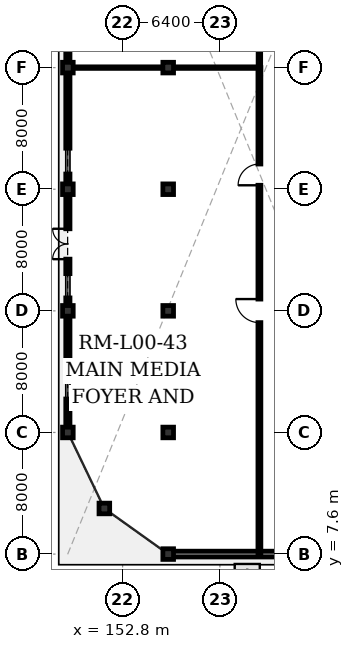
"""IFC4 building model, lengths in metres.
Left out: names, types, materials, properties, quantities, classifications, styles, units other than length and angle.
Written with IfcOpenShell. Run it as: python <this file> out.ifc"""

import sys

from ifc_helpers import new_model, si_unit, direction, frame, frame_2d, origin, origin_2d, place, context, subcontext, project, spatial, rectangle, extrude, element, fill, save


model = new_model("IFC4")
c1 = context("Model", 3, precision=1e-05, world=origin(), true_north=direction((0.0, 1.0)))
c2 = subcontext(c1, "Body", "Model", "MODEL_VIEW")
j1 = project(units=[si_unit("LENGTHUNIT", "METRE"), si_unit("PLANEANGLEUNIT", "RADIAN")], contexts=[c1])
p1 = place(None, origin())
s1 = spatial("IfcSite", under=j1, at=p1, CompositionType="ELEMENT")
p2 = place(p1, origin())
s2 = spatial("IfcBuilding", under=s1, at=p2, CompositionType="ELEMENT")
p3 = place(p2, origin())
s3 = spatial("IfcBuildingStorey", under=s2, at=p3, CompositionType="ELEMENT", Elevation=0.0)
for number, where, z_axis, x_axis in (
    (1, (149.2, 15.6, 0.0), (0.0, 0.0, 1.0), (1.0, 0.0, 0.0)),
    (2, (149.2, 23.6, 0.0), (0.0, 0.0, 1.0), (1.0, 0.0, 0.0)),
    (3, (149.2, 31.6, 0.0), (0.0, 0.0, 1.0), (1.0, 0.0, 0.0)),
    (4, (149.2, 39.6, 0.0), (0.0, 0.0, 1.0), (1.0, 0.0, 0.0)),
    (5, (151.6, 10.6, 0.0), (0.0, 0.0, 1.0), (1.0, 0.0, 0.0)),
    (6, (155.8, 7.6, 0.0), (0.0, 0.0, 1.0), (1.0, 0.0, 0.0)),
    (7, (155.8, 15.6, 0.0), (0.0, 0.0, 1.0), (1.0, 0.0, 0.0)),
    (8, (155.8, 23.6, 0.0), (0.0, 0.0, 1.0), (1.0, 0.0, 0.0)),
    (9, (155.8, 31.6, 0.0), (0.0, 0.0, 1.0), (1.0, 0.0, 0.0)),
    (10, (155.8, 39.6, 0.0), (0.0, 0.0, 1.0), (1.0, 0.0, 0.0)),
):
    element("IfcColumn", number, at=place(p3, frame(where, z_axis=z_axis, x_axis=x_axis)), inside=s3, PredefinedType="COLUMN", context=c2, shape_type="SweptSolid", body=[
        extrude(rectangle(XDim=0.7, YDim=0.7, at=origin_2d()), origin(), (0.0, 0.0, 1.0), 5.4),
    ])
p4 = place(p3, frame((149.2, 15.6, 0.0), z_axis=(0.0, 0.0, 1.0), x_axis=(0.0, 1.0, 0.0)))
e11 = element("IfcWall", 11, at=p4, inside=s3, PredefinedType="SOLIDWALL", context=c2, shape_type="SweptSolid", body=[
    extrude(rectangle(XDim=48.0, YDim=0.275, at=frame_2d((24.0, 0.0))), origin(), (0.0, 0.0, 1.0), 4.29),
])
p5 = place(p4, frame((11.4, 0.0, 0.0)))
e12 = element("IfcOpeningElement", 12, at=p5, cuts=e11, PredefinedType="OPENING", context=c2, shape_type="SweptSolid", body=[
    extrude(rectangle(XDim=2.0, YDim=2.5, at=frame_2d((1.0, 1.25))), frame((0.0, 0.147, 0.0), z_axis=(0.0, -1.0, 0.0), x_axis=(1.0, 0.0, 0.0)), (0.0, 0.0, 1.0), 0.295),
])
p6 = place(p4, frame((2.2, 0.0, 0.8)))
e13 = element("IfcOpeningElement", 13, at=p6, cuts=e11, PredefinedType="OPENING", context=c2, shape_type="SweptSolid", body=[
    extrude(rectangle(XDim=1.5, YDim=2.1, at=frame_2d((0.75, 1.05))), frame((0.0, 0.147, 0.0), z_axis=(0.0, -1.0, 0.0), x_axis=(1.0, 0.0, 0.0)), (0.0, 0.0, 1.0), 0.295),
])
p7 = place(p4, frame((8.85, 0.0, 0.8)))
e14 = element("IfcOpeningElement", 14, at=p7, cuts=e11, PredefinedType="OPENING", context=c2, shape_type="SweptSolid", body=[
    extrude(rectangle(XDim=1.6, YDim=2.1, at=frame_2d((0.8, 1.05))), frame((0.0, 0.147, 0.0), z_axis=(0.0, -1.0, 0.0), x_axis=(1.0, 0.0, 0.0)), (0.0, 0.0, 1.0), 0.295),
])
p8 = place(p4, frame((17.0, 0.0, 0.8)))
e15 = element("IfcOpeningElement", 15, at=p8, cuts=e11, PredefinedType="OPENING", context=c2, shape_type="SweptSolid", body=[
    extrude(rectangle(XDim=1.7, YDim=2.15, at=frame_2d((0.85, 1.075))), frame((0.0, 0.147, 0.0), z_axis=(0.0, -1.0, 0.0), x_axis=(1.0, 0.0, 0.0)), (0.0, 0.0, 1.0), 0.295),
])
p9 = place(p4, frame((25.15, 0.0, 0.8)))
e16 = element("IfcOpeningElement", 16, at=p9, cuts=e11, PredefinedType="OPENING", context=c2, shape_type="SweptSolid", body=[
    extrude(rectangle(XDim=1.8, YDim=2.15, at=frame_2d((0.9, 1.075))), frame((0.0, 0.147, 0.0), z_axis=(0.0, -1.0, 0.0), x_axis=(1.0, 0.0, 0.0)), (0.0, 0.0, 1.0), 0.295),
])
p10 = place(p4, frame((33.25, 0.0, 0.8)))
e17 = element("IfcOpeningElement", 17, at=p10, cuts=e11, PredefinedType="OPENING", context=c2, shape_type="SweptSolid", body=[
    extrude(rectangle(XDim=1.9, YDim=2.2, at=frame_2d((0.95, 1.1))), frame((0.0, 0.147, 0.0), z_axis=(0.0, -1.0, 0.0), x_axis=(1.0, 0.0, 0.0)), (0.0, 0.0, 1.0), 0.295),
])
p11 = place(p4, frame((40.65, 0.0, 0.8)))
e18 = element("IfcOpeningElement", 18, at=p11, cuts=e11, PredefinedType="OPENING", context=c2, shape_type="SweptSolid", body=[
    extrude(rectangle(XDim=2.0, YDim=2.2, at=frame_2d((1.0, 1.1))), frame((0.0, 0.147, 0.0), z_axis=(0.0, -1.0, 0.0), x_axis=(1.0, 0.0, 0.0)), (0.0, 0.0, 1.0), 0.295),
])
p12 = place(p3, frame((164.6, 7.6, 0.0), z_axis=(0.0, 0.0, 1.0), x_axis=(-1.0, 0.0, 0.0)))
e19 = element("IfcWall", 19, at=p12, inside=s3, PredefinedType="SOLIDWALL", context=c2, shape_type="SweptSolid", body=[
    extrude(rectangle(XDim=8.8, YDim=0.38, at=frame_2d((4.4, 0.0))), origin(), (0.0, 0.0, 1.0), 4.29),
])
p13 = place(p3, frame((161.8, 7.6, 0.0), z_axis=(0.0, 0.0, 1.0), x_axis=(0.0, 1.0, 0.0)))
e20 = element("IfcWall", 20, at=p13, inside=s3, PredefinedType="PARTITIONING", context=c2, shape_type="SweptSolid", body=[
    extrude(rectangle(XDim=32.0, YDim=0.19, at=frame_2d((16.0, 0.0))), origin(), (0.0, 0.0, 1.0), 5.14),
])
p14 = place(p13, frame((15.225, 0.0, 0.0)))
e21 = element("IfcOpeningElement", 21, at=p14, cuts=e20, PredefinedType="OPENING", context=c2, shape_type="SweptSolid", body=[
    extrude(rectangle(XDim=1.55, YDim=2.25, at=frame_2d((0.775, 1.125))), frame((0.0, 0.105, 0.0), z_axis=(0.0, -1.0, 0.0), x_axis=(1.0, 0.0, 0.0)), (0.0, 0.0, 1.0), 0.21),
])
p15 = place(p13, frame((24.26, 0.0, 0.0)))
e22 = element("IfcOpeningElement", 22, at=p15, cuts=e20, PredefinedType="OPENING", context=c2, shape_type="SweptSolid", body=[
    extrude(rectangle(XDim=1.4, YDim=2.25, at=frame_2d((0.7, 1.125))), frame((0.0, 0.105, 0.0), z_axis=(0.0, -1.0, 0.0), x_axis=(1.0, 0.0, 0.0)), (0.0, 0.0, 1.0), 0.21),
])
p16 = place(p3, frame((161.8, 39.6, 0.0), z_axis=(0.0, 0.0, 1.0), x_axis=(0.0, 1.0, 0.0)))
e23 = element("IfcWall", 23, at=p16, inside=s3, PredefinedType="PARTITIONING", context=c2, shape_type="SweptSolid", body=[
    extrude(rectangle(XDim=24.0, YDim=0.165, at=frame_2d((12.0, 0.0))), origin(), (0.0, 0.0, 1.0), 5.14),
])
p17 = place(p16, frame((11.2, 0.0, 0.0)))
e24 = element("IfcOpeningElement", 24, at=p17, cuts=e23, PredefinedType="OPENING", context=c2, shape_type="SweptSolid", body=[
    extrude(rectangle(XDim=1.6, YDim=2.3, at=frame_2d((0.8, 1.15))), frame((0.0, 0.093, 0.0), z_axis=(0.0, -1.0, 0.0), x_axis=(1.0, 0.0, 0.0)), (0.0, 0.0, 1.0), 0.185),
])
p18 = place(p16, frame((17.92, 0.0, 0.0)))
e25 = element("IfcOpeningElement", 25, at=p18, cuts=e23, PredefinedType="OPENING", context=c2, shape_type="SweptSolid", body=[
    extrude(rectangle(XDim=1.6, YDim=2.3, at=frame_2d((0.8, 1.15))), frame((0.0, 0.093, 0.0), z_axis=(0.0, -1.0, 0.0), x_axis=(1.0, 0.0, 0.0)), (0.0, 0.0, 1.0), 0.185),
])
p19 = place(p3, frame((149.552, 39.6, 0.0), z_axis=(0.0, 0.0, 1.0), x_axis=(1.0, 0.0, 0.0)))
e26 = element("IfcWall", 26, at=p19, inside=s3, PredefinedType="PARTITIONING", context=c2, shape_type="SweptSolid", body=[
    extrude(rectangle(XDim=12.248, YDim=0.1, at=frame_2d((6.124, 0.0))), origin(), (0.0, 0.0, 1.0), 4.29),
])
p20 = place(p5, origin())
e27 = element("IfcDoor", 27, at=p20, inside=s3, OperationType="DOUBLE_SWING_LEFT", PredefinedType="DOOR", context=c2, shape_type="SweptSolid", body=[
    extrude(rectangle(XDim=2.0, YDim=2.5, at=frame_2d((1.0, 1.25))), frame((0.0, 0.025, 0.0), z_axis=(0.0, -1.0, 0.0), x_axis=(1.0, 0.0, 0.0)), (0.0, 0.0, 1.0), 0.05),
])
fill(e12, e27)
p21 = place(p6, origin())
e28 = element("IfcWindow", 28, at=p21, inside=s3, PartitioningType="SINGLE_PANEL", PredefinedType="WINDOW", context=c2, shape_type="SweptSolid", body=[
    extrude(rectangle(XDim=1.5, YDim=2.1, at=frame_2d((0.75, 1.05))), frame((0.0, 0.03, 0.0), z_axis=(0.0, -1.0, 0.0), x_axis=(1.0, 0.0, 0.0)), (0.0, 0.0, 1.0), 0.06),
])
fill(e13, e28)
p22 = place(p7, origin())
e29 = element("IfcWindow", 29, at=p22, inside=s3, PartitioningType="SINGLE_PANEL", PredefinedType="WINDOW", context=c2, shape_type="SweptSolid", body=[
    extrude(rectangle(XDim=1.6, YDim=2.1, at=frame_2d((0.8, 1.05))), frame((0.0, 0.03, 0.0), z_axis=(0.0, -1.0, 0.0), x_axis=(1.0, 0.0, 0.0)), (0.0, 0.0, 1.0), 0.06),
])
fill(e14, e29)
p23 = place(p8, origin())
e30 = element("IfcWindow", 30, at=p23, inside=s3, PartitioningType="SINGLE_PANEL", PredefinedType="WINDOW", context=c2, shape_type="SweptSolid", body=[
    extrude(rectangle(XDim=1.7, YDim=2.15, at=frame_2d((0.85, 1.075))), frame((0.0, 0.03, 0.0), z_axis=(0.0, -1.0, 0.0), x_axis=(1.0, 0.0, 0.0)), (0.0, 0.0, 1.0), 0.06),
])
fill(e15, e30)
p24 = place(p14, origin())
e31 = element("IfcDoor", 31, at=p24, inside=s3, OperationType="SINGLE_SWING_RIGHT", PredefinedType="DOOR", context=c2, shape_type="SweptSolid", body=[
    extrude(rectangle(XDim=1.55, YDim=2.25, at=frame_2d((0.775, 1.125))), frame((0.0, 0.025, 0.0), z_axis=(0.0, -1.0, 0.0), x_axis=(1.0, 0.0, 0.0)), (0.0, 0.0, 1.0), 0.05),
])
fill(e21, e31)
p25 = place(p15, origin())
e32 = element("IfcDoor", 32, at=p25, inside=s3, OperationType="SINGLE_SWING_LEFT", PredefinedType="DOOR", context=c2, shape_type="SweptSolid", body=[
    extrude(rectangle(XDim=1.4, YDim=2.25, at=frame_2d((0.7, 1.125))), frame((0.0, 0.025, 0.0), z_axis=(0.0, -1.0, 0.0), x_axis=(1.0, 0.0, 0.0)), (0.0, 0.0, 1.0), 0.05),
])
fill(e22, e32)
save(model, sys.argv[1])
